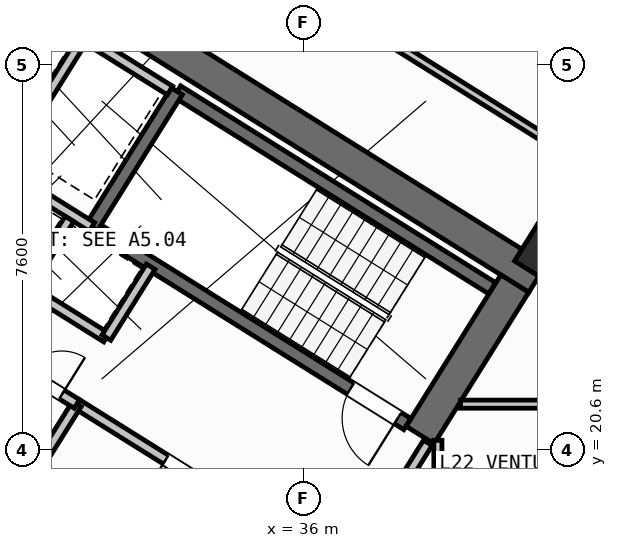
"""IFC4 building model, lengths in metres.
Left out: names, types, materials, properties, quantities, classifications, styles, units other than length and angle.
Written with IfcOpenShell. Run it as: python <this file> out.ifc"""

import sys

from ifc_helpers import new_model, si_unit, direction, frame, frame_2d, origin, origin_2d, place, context, subcontext, project, spatial, rectangle, hollow_rectangle, extrude, source, transform, mapped, element, fill, save


model = new_model("IFC4")
c1 = context("Model", 3, precision=1e-05, world=origin(), true_north=direction((0.0, 1.0)))
c2 = subcontext(c1, "Body", "Model", "MODEL_VIEW")
j1 = project(units=[si_unit("LENGTHUNIT", "METRE"), si_unit("PLANEANGLEUNIT", "RADIAN")], contexts=[c1])
p1 = place(None, origin())
s1 = spatial("IfcSite", under=j1, at=p1, CompositionType="ELEMENT")
p2 = place(p1, origin())
s2 = spatial("IfcBuilding", under=s1, at=p2, CompositionType="ELEMENT")
p3 = place(p2, frame((0.0, 0.0, 90.0)))
s3 = spatial("IfcBuildingStorey", under=s2, at=p3, CompositionType="ELEMENT", Elevation=90.0)
p4 = place(p3, frame((40.615, 23.983, 0.0), z_axis=(0.0, 0.0, 1.0), x_axis=(-0.848045953968, 0.529922692436, 0.0)))
e1 = element("IfcWall", 1, at=p4, inside=s3, PredefinedType="SHEAR", context=c2, shape_type="SweptSolid", body=[
    extrude(rectangle(XDim=13.24, YDim=0.65, at=frame_2d((6.62, 0.0))), origin(), (0.0, 0.0, 1.0), 3.35),
])
p5 = place(p3, frame((40.168, 23.88, 0.0), z_axis=(0.0, 0.0, 1.0), x_axis=(-0.529893103397, -0.8480644427, 0.0)))
e2 = element("IfcWall", 2, at=p5, inside=s3, PredefinedType="SHEAR", context=c2, shape_type="SweptSolid", body=[
    extrude(rectangle(XDim=3.525, YDim=0.65, at=frame_2d((1.763, 0.0))), origin(), (0.0, 0.0, 1.0), 3.35),
])
m1 = source(origin(), c2, "Body", "SweptSolid", [
    extrude(hollow_rectangle(XDim=0.9, YDim=0.9, WallThickness=0.036, at=origin_2d()), origin(), (0.0, 0.0, 1.0), 3.6),
])
p6 = place(p3, frame((40.783, 24.469, 0.0), z_axis=(0.0, 0.0, 1.0), x_axis=(-0.848048096156, 0.529919264233, 0.0)))
e3 = element("IfcColumn", 3, at=p6, inside=s3, PredefinedType="COLUMN", context=c2, shape_type="MappedRepresentation", body=[
    mapped(m1, transform((0.0, 0.0, 0.0), scale=1.0)),
])
p7 = place(p3, frame((31.76, 12.183, 0.0), z_axis=(0.0, 0.0, 1.0), x_axis=(-0.848047074256, 0.529920899612, 0.0)))
e4 = element("IfcWall", 4, at=p7, inside=s3, PredefinedType="STANDARD", context=c2, shape_type="SweptSolid", body=[
    extrude(rectangle(XDim=30.652, YDim=0.32, at=frame_2d((15.326, 0.0))), origin(), (0.0, 0.0, 1.0), 3.35),
])
p8 = place(p7, frame((15.153, 0.0, 0.0)))
e5 = element("IfcOpeningElement", 5, at=p8, cuts=e4, PredefinedType="OPENING", context=c2, shape_type="SweptSolid", body=[
    extrude(rectangle(XDim=1.2, YDim=2.15, at=frame_2d((0.6, 1.075))), frame((0.0, 0.17, 0.0), z_axis=(0.0, -1.0, 0.0), x_axis=(1.0, 0.0, 0.0)), (0.0, 0.0, 1.0), 0.34),
])
p9 = place(p7, frame((2.002, 0.0, 0.8)))
e6 = element("IfcOpeningElement", 6, at=p9, cuts=e4, PredefinedType="OPENING", context=c2, shape_type="SweptSolid", body=[
    extrude(rectangle(XDim=2.1, YDim=1.55, at=frame_2d((1.05, 0.775))), frame((0.0, 0.17, 0.0), z_axis=(0.0, -1.0, 0.0), x_axis=(1.0, 0.0, 0.0)), (0.0, 0.0, 1.0), 0.34),
])
p10 = place(p7, frame((7.206, 0.0, 0.8)))
e7 = element("IfcOpeningElement", 7, at=p10, cuts=e4, PredefinedType="OPENING", context=c2, shape_type="SweptSolid", body=[
    extrude(rectangle(XDim=2.1, YDim=1.55, at=frame_2d((1.05, 0.775))), frame((0.0, 0.17, 0.0), z_axis=(0.0, -1.0, 0.0), x_axis=(1.0, 0.0, 0.0)), (0.0, 0.0, 1.0), 0.34),
])
p11 = place(p7, frame((12.648, 0.0, 1.0)))
e8 = element("IfcOpeningElement", 8, at=p11, cuts=e4, PredefinedType="OPENING", context=c2, shape_type="SweptSolid", body=[
    extrude(rectangle(XDim=0.9, YDim=1.25, at=frame_2d((0.45, 0.625))), frame((0.0, 0.17, 0.0), z_axis=(0.0, -1.0, 0.0), x_axis=(1.0, 0.0, 0.0)), (0.0, 0.0, 1.0), 0.34),
])
p12 = place(p7, frame((27.974, 0.0, 0.95)))
e9 = element("IfcOpeningElement", 9, at=p12, cuts=e4, PredefinedType="OPENING", context=c2, shape_type="SweptSolid", body=[
    extrude(rectangle(XDim=1.2, YDim=1.4, at=frame_2d((0.6, 0.7))), frame((0.0, 0.17, 0.0), z_axis=(0.0, -1.0, 0.0), x_axis=(1.0, 0.0, 0.0)), (0.0, 0.0, 1.0), 0.34),
])
p13 = place(p7, frame((18.347, 0.0, 1.0)))
e10 = element("IfcOpeningElement", 10, at=p13, cuts=e4, PredefinedType="OPENING", context=c2, shape_type="SweptSolid", body=[
    extrude(rectangle(XDim=0.9, YDim=1.25, at=frame_2d((0.45, 0.625))), frame((0.0, 0.17, 0.0), z_axis=(0.0, -1.0, 0.0), x_axis=(1.0, 0.0, 0.0)), (0.0, 0.0, 1.0), 0.34),
])
p14 = place(p7, frame((20.931, 0.0, 1.0)))
e11 = element("IfcOpeningElement", 11, at=p14, cuts=e4, PredefinedType="OPENING", context=c2, shape_type="SweptSolid", body=[
    extrude(rectangle(XDim=0.65, YDim=1.15, at=frame_2d((0.325, 0.575))), frame((0.0, 0.17, 0.0), z_axis=(0.0, -1.0, 0.0), x_axis=(1.0, 0.0, 0.0)), (0.0, 0.0, 1.0), 0.34),
])
p15 = place(p7, frame((22.938, 0.0, 1.0)))
e12 = element("IfcOpeningElement", 12, at=p15, cuts=e4, PredefinedType="OPENING", context=c2, shape_type="SweptSolid", body=[
    extrude(rectangle(XDim=0.9, YDim=1.25, at=frame_2d((0.45, 0.625))), frame((0.0, 0.17, 0.0), z_axis=(0.0, -1.0, 0.0), x_axis=(1.0, 0.0, 0.0)), (0.0, 0.0, 1.0), 0.34),
])
p16 = place(p7, frame((25.069, 0.0, 1.0)))
e13 = element("IfcOpeningElement", 13, at=p16, cuts=e4, PredefinedType="OPENING", context=c2, shape_type="SweptSolid", body=[
    extrude(rectangle(XDim=0.9, YDim=1.25, at=frame_2d((0.45, 0.625))), frame((0.0, 0.17, 0.0), z_axis=(0.0, -1.0, 0.0), x_axis=(1.0, 0.0, 0.0)), (0.0, 0.0, 1.0), 0.34),
])
p17 = place(p3, frame((31.28, 18.261, 0.0), z_axis=(0.0, 0.0, 1.0), x_axis=(-0.848051618787, 0.529913626805, 0.0)))
e14 = element("IfcWall", 14, at=p17, inside=s3, PredefinedType="SHEAR", context=c2, shape_type="SweptSolid", body=[
    extrude(rectangle(XDim=7.46, YDim=0.26, at=frame_2d((3.73, 0.0))), origin(), (0.0, 0.0, 1.0), 3.35),
])
p18 = place(p17, frame((0.36, 0.0, 0.0)))
e15 = element("IfcOpeningElement", 15, at=p18, cuts=e14, PredefinedType="OPENING", context=c2, shape_type="SweptSolid", body=[
    extrude(rectangle(XDim=0.86, YDim=2.05, at=frame_2d((0.43, 1.025))), frame((0.0, 0.14, 0.0), z_axis=(0.0, -1.0, 0.0), x_axis=(1.0, 0.0, 0.0)), (0.0, 0.0, 1.0), 0.28),
])
p19 = place(p3, frame((39.721, 23.788, 0.0), z_axis=(0.0, 0.0, 1.0), x_axis=(-0.848054434086, 0.529909121291, 0.0)))
e16 = element("IfcWall", 16, at=p19, inside=s3, PredefinedType="SHEAR", context=c2, shape_type="SweptSolid", body=[
    extrude(rectangle(XDim=7.33, YDim=0.26, at=frame_2d((3.665, 0.0))), origin(), (0.0, 0.0, 1.0), 3.35),
])
p20 = place(p3, frame((38.046, 21.108, 0.0), z_axis=(0.0, 0.0, 1.0), x_axis=(-0.848054434086, 0.529909121291, 0.0)))
e17 = element("IfcWall", 17, at=p20, inside=s3, PredefinedType="SHEAR", context=c2, shape_type="SweptSolid", body=[
    extrude(rectangle(XDim=7.33, YDim=0.26, at=frame_2d((3.665, 0.0))), origin(), (0.0, 0.0, 1.0), 3.35),
])
p21 = place(p20, frame((0.22, 0.0, 0.0)))
e18 = element("IfcOpeningElement", 18, at=p21, cuts=e17, PredefinedType="OPENING", context=c2, shape_type="SweptSolid", body=[
    extrude(rectangle(XDim=1.1, YDim=2.1, at=frame_2d((0.55, 1.05))), frame((0.0, 0.14, 0.0), z_axis=(0.0, -1.0, 0.0), x_axis=(1.0, 0.0, 0.0)), (0.0, 0.0, 1.0), 0.28),
])
p22 = place(p3, frame((33.496, 27.677, 0.0), z_axis=(0.0, 0.0, 1.0), x_axis=(-0.529908658664, -0.84805472316, 0.0)))
e19 = element("IfcWall", 19, at=p22, inside=s3, PredefinedType="SHEAR", context=c2, shape_type="SweptSolid", body=[
    extrude(rectangle(XDim=3.16, YDim=0.26, at=frame_2d((1.58, 0.0))), origin(), (0.0, 0.0, 1.0), 3.35),
])
p23 = place(p3, frame((36.374, 18.474, 0.0), z_axis=(0.0, 0.0, 1.0), x_axis=(-0.848051071577, 0.529914502535, 0.0)))
e20 = element("IfcWall", 20, at=p23, inside=s3, PredefinedType="STANDARD", context=c2, shape_type="SweptSolid", body=[
    extrude(rectangle(XDim=5.718, YDim=0.2, at=frame_2d((2.859, 0.0))), origin(), (0.0, 0.0, 1.0), 3.34),
])
p24 = place(p23, frame((2.498, 0.0, 0.0)))
e21 = element("IfcOpeningElement", 21, at=p24, cuts=e20, PredefinedType="OPENING", context=c2, shape_type="SweptSolid", body=[
    extrude(rectangle(XDim=1.15, YDim=2.1, at=frame_2d((0.575, 1.05))), frame((0.0, 0.11, 0.0), z_axis=(0.0, -1.0, 0.0), x_axis=(1.0, 0.0, 0.0)), (0.0, 0.0, 1.0), 0.22),
])
p25 = place(p3, frame((31.822, 24.998, 0.0), z_axis=(0.0, 0.0, 1.0), x_axis=(-0.848058348634, 0.529902856485, 0.0)))
e22 = element("IfcWall", 22, at=p25, inside=s3, PredefinedType="STANDARD", context=c2, shape_type="SweptSolid", body=[
    extrude(rectangle(XDim=4.568, YDim=0.2, at=frame_2d((2.284, 0.0))), origin(), (0.0, 0.0, 1.0), 3.34),
])
p26 = place(p3, frame((32.108, 22.814, 0.0), z_axis=(0.0, 0.0, 1.0), x_axis=(-0.848042229521, 0.529928652696, 0.0)))
e23 = element("IfcWall", 23, at=p26, inside=s3, PredefinedType="STANDARD", context=c2, shape_type="SweptSolid", body=[
    extrude(rectangle(XDim=5.62, YDim=0.2, at=frame_2d((2.81, 0.0))), origin(), (0.0, 0.0, 1.0), 3.34),
])
p27 = place(p3, frame((32.982, 24.213, 0.0), z_axis=(0.0, 0.0, 1.0), x_axis=(-0.529839334948, -0.84809803628, 0.0)))
e24 = element("IfcWall", 24, at=p27, inside=s3, PredefinedType="STANDARD", context=c2, shape_type="SweptSolid", body=[
    extrude(rectangle(XDim=1.65, YDim=0.2, at=frame_2d((0.825, 0.0))), origin(), (0.0, 0.0, 1.0), 3.34),
])
p28 = place(p3, frame((31.645, 28.716, 0.0), z_axis=(0.0, 0.0, 1.0), x_axis=(-0.52986693015, -0.848080795876, 0.0)))
e25 = element("IfcWall", 25, at=p28, inside=s3, PredefinedType="STANDARD", context=c2, shape_type="SweptSolid", body=[
    extrude(rectangle(XDim=2.66, YDim=0.2, at=frame_2d((1.33, 0.0))), origin(), (0.0, 0.0, 1.0), 3.34),
])
p29 = place(p3, frame((33.363, 27.69, 0.0), z_axis=(0.0, 0.0, 1.0), x_axis=(-0.848053806312, 0.529910125964, 0.0)))
e26 = element("IfcWall", 26, at=p29, inside=s3, PredefinedType="STANDARD", context=c2, shape_type="SweptSolid", body=[
    extrude(rectangle(XDim=4.448, YDim=0.2, at=frame_2d((2.224, 0.0))), origin(), (0.0, 0.0, 1.0), 3.34),
])
p30 = place(p3, frame((31.379, 25.156, 0.0), z_axis=(0.0, 0.0, 1.0), x_axis=(-0.529998940003, -0.847998304005, 0.0)))
e27 = element("IfcWall", 27, at=p30, inside=s3, PredefinedType="STANDARD", context=c2, shape_type="SweptSolid", body=[
    extrude(rectangle(XDim=1.58, YDim=0.2, at=frame_2d((0.79, 0.0))), origin(), (0.0, 0.0, 1.0), 3.34),
])
p31 = place(p3, frame((31.525, 21.504, 0.0), z_axis=(0.0, 0.0, 1.0), x_axis=(-0.529907497854, -0.848055448493, 0.0)))
e28 = element("IfcWall", 28, at=p31, inside=s3, PredefinedType="STANDARD", context=c2, shape_type="SweptSolid", body=[
    extrude(rectangle(XDim=2.88, YDim=0.2, at=frame_2d((1.44, 0.0))), origin(), (0.0, 0.0, 1.0), 3.34),
])
p32 = place(p3, frame((31.525, 21.504, 0.0), z_axis=(0.0, 0.0, 1.0), x_axis=(-0.848044998614, 0.529924221305, 0.0)))
e29 = element("IfcWall", 29, at=p32, inside=s3, PredefinedType="STANDARD", context=c2, shape_type="SweptSolid", body=[
    extrude(rectangle(XDim=6.168, YDim=0.2, at=frame_2d((3.084, 0.0))), origin(), (0.0, 0.0, 1.0), 3.34),
])
p33 = place(p32, frame((4.4, 0.0, 0.0)))
e30 = element("IfcOpeningElement", 30, at=p33, cuts=e29, PredefinedType="OPENING", context=c2, shape_type="SweptSolid", body=[
    extrude(rectangle(XDim=0.86, YDim=2.05, at=frame_2d((0.43, 1.025))), frame((0.0, 0.11, 0.0), z_axis=(0.0, -1.0, 0.0), x_axis=(1.0, 0.0, 0.0)), (0.0, 0.0, 1.0), 0.22),
])
p34 = place(p32, frame((0.35, 0.0, 0.0)))
e31 = element("IfcOpeningElement", 31, at=p34, cuts=e29, PredefinedType="OPENING", context=c2, shape_type="SweptSolid", body=[
    extrude(rectangle(XDim=0.86, YDim=2.05, at=frame_2d((0.43, 1.025))), frame((0.0, 0.11, 0.0), z_axis=(0.0, -1.0, 0.0), x_axis=(1.0, 0.0, 0.0)), (0.0, 0.0, 1.0), 0.22),
])
p35 = place(p3, frame((41.936, 26.012, 0.0), z_axis=(0.0, 0.0, 1.0), x_axis=(-0.848051154596, 0.529914369676, 0.0)))
e32 = element("IfcWall", 32, at=p35, inside=s3, PredefinedType="PARTITIONING", context=c2, shape_type="SweptSolid", body=[
    extrude(rectangle(XDim=15.57, YDim=0.16, at=frame_2d((7.785, 0.0))), origin(), (0.0, 0.0, 1.0), 3.34),
])
p36 = place(p35, frame((10.83, 0.0, 0.0)))
e33 = element("IfcOpeningElement", 33, at=p36, cuts=e32, PredefinedType="OPENING", context=c2, shape_type="SweptSolid", body=[
    extrude(rectangle(XDim=1.0, YDim=2.1, at=frame_2d((0.5, 1.05))), frame((0.0, 0.09, 0.0), z_axis=(0.0, -1.0, 0.0), x_axis=(1.0, 0.0, 0.0)), (0.0, 0.0, 1.0), 0.18),
])
p37 = place(p3, frame((38.451, 20.737, 0.0), z_axis=(0.0, 0.0, 1.0), x_axis=(-0.529924799939, -0.848044637038, 0.0)))
e34 = element("IfcWall", 34, at=p37, inside=s3, PredefinedType="STANDARD", context=c2, shape_type="SweptSolid", body=[
    extrude(rectangle(XDim=2.96, YDim=0.2, at=frame_2d((1.48, 0.0))), origin(), (0.0, 0.0, 1.0), 3.34),
])
p38 = place(p37, frame((1.46, 0.0, 0.0)))
e35 = element("IfcOpeningElement", 35, at=p38, cuts=e34, PredefinedType="OPENING", context=c2, shape_type="SweptSolid", body=[
    extrude(rectangle(XDim=0.86, YDim=2.05, at=frame_2d((0.43, 1.025))), frame((0.0, 0.11, 0.0), z_axis=(0.0, -1.0, 0.0), x_axis=(1.0, 0.0, 0.0)), (0.0, 0.0, 1.0), 0.22),
])
p39 = place(p3, frame((38.65, 17.93, 0.0), z_axis=(0.0, 0.0, 1.0), x_axis=(0.0, 1.0, 0.0)))
e36 = element("IfcWall", 36, at=p39, inside=s3, PredefinedType="PARTITIONING", context=c2, shape_type="SweptSolid", body=[
    extrude(rectangle(XDim=2.857, YDim=0.16, at=frame_2d((1.428, 0.0))), origin(), (0.0, 0.0, 1.0), 3.34),
])
p40 = place(p3, frame((39.095, 21.5, 0.0), z_axis=(0.0, 0.0, 1.0), x_axis=(1.0, 0.0, 0.0)))
e37 = element("IfcWall", 37, at=p40, inside=s3, PredefinedType="PARTITIONING", context=c2, shape_type="SweptSolid", body=[
    extrude(rectangle(XDim=7.094, YDim=0.16, at=frame_2d((3.547, 0.0))), origin(), (0.0, 0.0, 1.0), 3.34),
])
m2 = source(origin(), c2, "Body", "SweptSolid", [
    extrude(rectangle(XDim=1.1, YDim=2.1, at=frame_2d((0.55, 1.05))), frame((0.0, 0.025, 0.0), z_axis=(0.0, -1.0, 0.0), x_axis=(1.0, 0.0, 0.0)), (0.0, 0.0, 1.0), 0.05),
])
p41 = place(p21, origin())
e38 = element("IfcDoor", 38, at=p41, inside=s3, OperationType="SINGLE_SWING_LEFT", PredefinedType="DOOR", context=c2, shape_type="MappedRepresentation", body=[
    mapped(m2, transform((0.0, 0.0, 0.0), scale=1.0)),
])
fill(e18, e38)
m3 = source(origin(), c2, "Body", "SweptSolid", [
    extrude(rectangle(XDim=1.15, YDim=2.1, at=frame_2d((0.575, 1.05))), frame((0.0, 0.025, 0.0), z_axis=(0.0, -1.0, 0.0), x_axis=(1.0, 0.0, 0.0)), (0.0, 0.0, 1.0), 0.05),
])
p42 = place(p24, origin())
e39 = element("IfcDoor", 39, at=p42, inside=s3, OperationType="SINGLE_SWING_RIGHT", PredefinedType="DOOR", context=c2, shape_type="MappedRepresentation", body=[
    mapped(m3, transform((0.0, 0.0, 0.0), scale=1.0)),
])
fill(e21, e39)
m4 = source(origin(), c2, "Body", "SweptSolid", [
    extrude(rectangle(XDim=0.86, YDim=2.05, at=frame_2d((0.43, 1.025))), frame((0.0, 0.025, 0.0), z_axis=(0.0, -1.0, 0.0), x_axis=(1.0, 0.0, 0.0)), (0.0, 0.0, 1.0), 0.05),
])
p43 = place(p34, frame((0.86, 0.0, 0.0), z_axis=(0.0, 0.0, 1.0), x_axis=(-1.0, 0.0, 0.0)))
e40 = element("IfcDoor", 40, at=p43, inside=s3, OperationType="SINGLE_SWING_RIGHT", PredefinedType="DOOR", context=c2, shape_type="MappedRepresentation", body=[
    mapped(m4, transform((0.0, 0.0, 0.0), scale=1.0)),
])
fill(e31, e40)
save(model, sys.argv[1])
